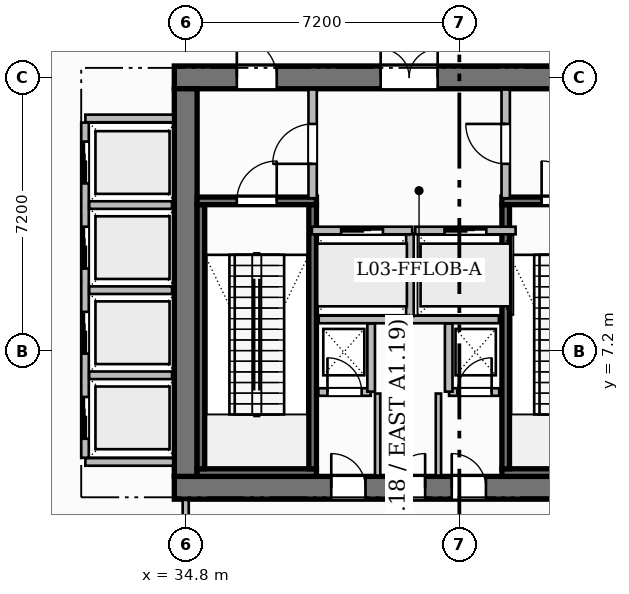
"""IFC4 building model, lengths in metres.
Left out: names, types, materials, properties, quantities, classifications, styles, units other than length and angle.
Written with IfcOpenShell. Run it as: python <this file> out.ifc"""

import sys

from ifc_helpers import new_model, si_unit, direction, frame, frame_2d, origin, place, context, subcontext, project, spatial, rectangle, extrude, source, transform, mapped, element, fill, save


model = new_model("IFC4")
c1 = context("Model", 3, precision=1e-05, world=origin(), true_north=direction((0.0, 1.0)))
c2 = subcontext(c1, "Body", "Model", "MODEL_VIEW")
j1 = project(units=[si_unit("LENGTHUNIT", "METRE"), si_unit("PLANEANGLEUNIT", "RADIAN")], contexts=[c1])
p1 = place(None, origin())
s1 = spatial("IfcSite", under=j1, at=p1, CompositionType="ELEMENT")
p2 = place(p1, origin())
s2 = spatial("IfcBuilding", under=s1, at=p2, CompositionType="ELEMENT")
p3 = place(p2, frame((0.0, 0.0, 16.2)))
s3 = spatial("IfcBuildingStorey", under=s2, at=p3, CompositionType="ELEMENT", Elevation=16.2)
p4 = place(p3, frame((34.5, 3.6, 0.0), z_axis=(0.0, 0.0, 1.0), x_axis=(1.0, 0.0, 0.0)))
e1 = element("IfcWall", 1, at=p4, inside=s3, PredefinedType="SHEAR", context=c2, shape_type="SweptSolid", body=[
    extrude(rectangle(XDim=15.6, YDim=0.6, at=frame_2d((7.8, 0.0))), origin(), (0.0, 0.0, 1.0), 5.4),
])
p5 = place(p4, frame((4.13, 0.0, 0.0)))
e2 = element("IfcOpeningElement", 2, at=p5, cuts=e1, PredefinedType="OPENING", context=c2, shape_type="SweptSolid", body=[
    extrude(rectangle(XDim=0.9, YDim=2.1, at=frame_2d((0.45, 1.05))), frame((0.0, 0.31, 0.0), z_axis=(0.0, -1.0, 0.0), x_axis=(1.0, 0.0, 0.0)), (0.0, 0.0, 1.0), 0.62),
])
p6 = place(p4, frame((5.7, 0.0, 0.0)))
e3 = element("IfcOpeningElement", 3, at=p6, cuts=e1, PredefinedType="OPENING", context=c2, shape_type="SweptSolid", body=[
    extrude(rectangle(XDim=0.9, YDim=2.1, at=frame_2d((0.45, 1.05))), frame((0.0, 0.31, 0.0), z_axis=(0.0, -1.0, 0.0), x_axis=(1.0, 0.0, 0.0)), (0.0, 0.0, 1.0), 0.62),
])
p7 = place(p4, frame((7.3, 0.0, 0.0)))
e4 = element("IfcOpeningElement", 4, at=p7, cuts=e1, PredefinedType="OPENING", context=c2, shape_type="SweptSolid", body=[
    extrude(rectangle(XDim=0.9, YDim=2.1, at=frame_2d((0.45, 1.05))), frame((0.0, 0.31, 0.0), z_axis=(0.0, -1.0, 0.0), x_axis=(1.0, 0.0, 0.0)), (0.0, 0.0, 1.0), 0.62),
])
p8 = place(p3, frame((34.5, 14.4, 0.0), z_axis=(0.0, 0.0, 1.0), x_axis=(1.0, 0.0, 0.0)))
e5 = element("IfcWall", 5, at=p8, inside=s3, PredefinedType="SHEAR", context=c2, shape_type="SweptSolid", body=[
    extrude(rectangle(XDim=15.6, YDim=0.6, at=frame_2d((7.8, 0.0))), origin(), (0.0, 0.0, 1.0), 5.4),
])
p9 = place(p8, frame((5.43, 0.0, 0.0)))
e6 = element("IfcOpeningElement", 6, at=p9, cuts=e5, PredefinedType="OPENING", context=c2, shape_type="SweptSolid", body=[
    extrude(rectangle(XDim=1.5, YDim=2.2, at=frame_2d((0.75, 1.1))), frame((0.0, 0.31, 0.0), z_axis=(0.0, -1.0, 0.0), x_axis=(1.0, 0.0, 0.0)), (0.0, 0.0, 1.0), 0.62),
])
p10 = place(p8, frame((1.645, 0.0, 0.0)))
e7 = element("IfcOpeningElement", 7, at=p10, cuts=e5, PredefinedType="OPENING", context=c2, shape_type="SweptSolid", body=[
    extrude(rectangle(XDim=1.05, YDim=2.15, at=frame_2d((0.525, 1.075))), frame((0.0, 0.31, 0.0), z_axis=(0.0, -1.0, 0.0), x_axis=(1.0, 0.0, 0.0)), (0.0, 0.0, 1.0), 0.62),
])
p11 = place(p8, frame((11.275, 0.0, 0.0)))
e8 = element("IfcOpeningElement", 8, at=p11, cuts=e5, PredefinedType="OPENING", context=c2, shape_type="SweptSolid", body=[
    extrude(rectangle(XDim=1.05, YDim=2.15, at=frame_2d((0.525, 1.075))), frame((0.0, 0.31, 0.0), z_axis=(0.0, -1.0, 0.0), x_axis=(1.0, 0.0, 0.0)), (0.0, 0.0, 1.0), 0.62),
])
p12 = place(p3, frame((34.8, 3.9, 0.0), z_axis=(0.0, 0.0, 1.0), x_axis=(0.0, 1.0, 0.0)))
e9 = element("IfcWall", 9, at=p12, inside=s3, PredefinedType="SHEAR", context=c2, shape_type="SweptSolid", body=[
    extrude(rectangle(XDim=10.2, YDim=0.6, at=frame_2d((5.1, 0.0))), origin(), (0.0, 0.0, 1.0), 5.4),
])
p13 = place(p3, frame((35.1, 4.0, 0.0), z_axis=(0.0, 0.0, 1.0), x_axis=(1.0, 0.0, 0.0)))
e10 = element("IfcWall", 10, at=p13, inside=s3, PredefinedType="SHEAR", context=c2, shape_type="SweptSolid", body=[
    extrude(rectangle(XDim=3.14, YDim=0.2, at=frame_2d((1.57, 0.0))), origin(), (0.0, 0.0, 1.0), 5.4),
])
for number, where, z_axis, x_axis in (
    (11, (35.2, 4.1, 0.0), (0.0, 0.0, 1.0), (0.0, 1.0, 0.0)),
    (12, (38.14, 4.1, 0.0), (0.0, 0.0, 1.0), (0.0, 1.0, 0.0)),
):
    element("IfcWall", number, at=place(p3, frame(where, z_axis=z_axis, x_axis=x_axis)), inside=s3, PredefinedType="SHEAR", context=c2, shape_type="SweptSolid", body=[
        extrude(rectangle(XDim=6.95, YDim=0.2, at=frame_2d((3.475, 0.0))), origin(), (0.0, 0.0, 1.0), 5.4),
    ])
p14 = place(p3, frame((35.1, 11.15, 0.0), z_axis=(0.0, 0.0, 1.0), x_axis=(1.0, 0.0, 0.0)))
e13 = element("IfcWall", 13, at=p14, inside=s3, PredefinedType="SHEAR", context=c2, shape_type="SweptSolid", body=[
    extrude(rectangle(XDim=3.14, YDim=0.2, at=frame_2d((1.57, 0.0))), origin(), (0.0, 0.0, 1.0), 5.4),
])
p15 = place(p14, frame((1.045, 0.0, 0.0)))
e14 = element("IfcOpeningElement", 14, at=p15, cuts=e13, PredefinedType="OPENING", context=c2, shape_type="SweptSolid", body=[
    extrude(rectangle(XDim=1.05, YDim=2.2, at=frame_2d((0.525, 1.1))), frame((0.0, 0.11, 0.0), z_axis=(0.0, -1.0, 0.0), x_axis=(1.0, 0.0, 0.0)), (0.0, 0.0, 1.0), 0.22),
])
p16 = place(p3, frame((43.12, 4.0, 0.0), z_axis=(0.0, 0.0, 1.0), x_axis=(1.0, 0.0, 0.0)))
e15 = element("IfcWall", 15, at=p16, inside=s3, PredefinedType="SHEAR", context=c2, shape_type="SweptSolid", body=[
    extrude(rectangle(XDim=6.38, YDim=0.2, at=frame_2d((3.19, 0.0))), origin(), (0.0, 0.0, 1.0), 5.4),
])
p17 = place(p3, frame((43.22, 4.1, 0.0), z_axis=(0.0, 0.0, 1.0), x_axis=(0.0, 1.0, 0.0)))
e16 = element("IfcWall", 16, at=p17, inside=s3, PredefinedType="SHEAR", context=c2, shape_type="SweptSolid", body=[
    extrude(rectangle(XDim=6.95, YDim=0.2, at=frame_2d((3.475, 0.0))), origin(), (0.0, 0.0, 1.0), 5.4),
])
p18 = place(p3, frame((43.12, 11.15, 0.0), z_axis=(0.0, 0.0, 1.0), x_axis=(1.0, 0.0, 0.0)))
e17 = element("IfcWall", 17, at=p18, inside=s3, PredefinedType="SHEAR", context=c2, shape_type="SweptSolid", body=[
    extrude(rectangle(XDim=6.38, YDim=0.2, at=frame_2d((3.19, 0.0))), origin(), (0.0, 0.0, 1.0), 5.4),
])
p19 = place(p18, frame((1.045, 0.0, 0.0)))
e18 = element("IfcOpeningElement", 18, at=p19, cuts=e17, PredefinedType="OPENING", context=c2, shape_type="SweptSolid", body=[
    extrude(rectangle(XDim=1.05, YDim=2.2, at=frame_2d((0.525, 1.1))), frame((0.0, 0.11, 0.0), z_axis=(0.0, -1.0, 0.0), x_axis=(1.0, 0.0, 0.0)), (0.0, 0.0, 1.0), 0.22),
])
p20 = place(p18, frame((4.125, 0.0, 0.0)))
e19 = element("IfcOpeningElement", 19, at=p20, cuts=e17, PredefinedType="OPENING", context=c2, shape_type="SweptSolid", body=[
    extrude(rectangle(XDim=1.05, YDim=2.2, at=frame_2d((0.525, 1.1))), frame((0.0, 0.11, 0.0), z_axis=(0.0, -1.0, 0.0), x_axis=(1.0, 0.0, 0.0)), (0.0, 0.0, 1.0), 0.22),
])
p21 = place(p3, frame((38.3, 8.03, 0.0), z_axis=(0.0, 0.0, 1.0), x_axis=(1.0, 0.0, 0.0)))
e20 = element("IfcWall", 20, at=p21, inside=s3, PredefinedType="PARTITIONING", context=c2, shape_type="SweptSolid", body=[
    extrude(rectangle(XDim=4.74, YDim=0.2, at=frame_2d((2.37, 0.0))), origin(), (0.0, 0.0, 1.0), 5.1),
])
p22 = place(p3, frame((40.7, 8.12, 0.0), z_axis=(0.0, 0.0, 1.0), x_axis=(0.0, 1.0, 0.0)))
e21 = element("IfcWall", 21, at=p22, inside=s3, PredefinedType="PARTITIONING", context=c2, shape_type="SweptSolid", body=[
    extrude(rectangle(XDim=2.18, YDim=0.2, at=frame_2d((1.09, 0.0))), origin(), (0.0, 0.0, 1.0), 5.1),
])
p23 = place(p3, frame((38.14, 11.22, 0.0), z_axis=(0.0, 0.0, 1.0), x_axis=(0.0, 1.0, 0.0)))
e22 = element("IfcWall", 22, at=p23, inside=s3, PredefinedType="PARTITIONING", context=c2, shape_type="SweptSolid", body=[
    extrude(rectangle(XDim=2.86, YDim=0.22, at=frame_2d((1.43, 0.0))), origin(), (0.0, 0.0, 1.0), 5.1),
])
p24 = place(p23, frame((0.905, 0.0, 0.0)))
e23 = element("IfcOpeningElement", 23, at=p24, cuts=e22, PredefinedType="OPENING", context=c2, shape_type="SweptSolid", body=[
    extrude(rectangle(XDim=1.05, YDim=2.15, at=frame_2d((0.525, 1.075))), frame((0.0, 0.12, 0.0), z_axis=(0.0, -1.0, 0.0), x_axis=(1.0, 0.0, 0.0)), (0.0, 0.0, 1.0), 0.24),
])
p25 = place(p3, frame((43.22, 11.22, 0.0), z_axis=(0.0, 0.0, 1.0), x_axis=(0.0, 1.0, 0.0)))
e24 = element("IfcWall", 24, at=p25, inside=s3, PredefinedType="PARTITIONING", context=c2, shape_type="SweptSolid", body=[
    extrude(rectangle(XDim=2.86, YDim=0.22, at=frame_2d((1.43, 0.0))), origin(), (0.0, 0.0, 1.0), 5.1),
])
p26 = place(p25, frame((0.905, 0.0, 0.0)))
e25 = element("IfcOpeningElement", 25, at=p26, cuts=e24, PredefinedType="OPENING", context=c2, shape_type="SweptSolid", body=[
    extrude(rectangle(XDim=1.05, YDim=2.15, at=frame_2d((0.525, 1.075))), frame((0.0, 0.12, 0.0), z_axis=(0.0, -1.0, 0.0), x_axis=(1.0, 0.0, 0.0)), (0.0, 0.0, 1.0), 0.24),
])
p27 = place(p3, frame((38.29, 6.12, 0.0), z_axis=(0.0, 0.0, 1.0), x_axis=(1.0, 0.0, 0.0)))
e26 = element("IfcWall", 26, at=p27, inside=s3, PredefinedType="PARTITIONING", context=c2, shape_type="SweptSolid", body=[
    extrude(rectangle(XDim=1.38, YDim=0.2, at=frame_2d((0.69, 0.0))), origin(), (0.0, 0.0, 1.0), 5.1),
])
p28 = place(p27, frame((0.24, 0.0, 0.0)))
e27 = element("IfcOpeningElement", 27, at=p28, cuts=e26, PredefinedType="OPENING", context=c2, shape_type="SweptSolid", body=[
    extrude(rectangle(XDim=0.9, YDim=2.1, at=frame_2d((0.45, 1.05))), frame((0.0, 0.11, 0.0), z_axis=(0.0, -1.0, 0.0), x_axis=(1.0, 0.0, 0.0)), (0.0, 0.0, 1.0), 0.22),
])
p29 = place(p3, frame((39.68, 6.13, 0.0), z_axis=(0.0, 0.0, 1.0), x_axis=(0.0, 1.0, 0.0)))
e28 = element("IfcWall", 28, at=p29, inside=s3, PredefinedType="PARTITIONING", context=c2, shape_type="SweptSolid", body=[
    extrude(rectangle(XDim=1.79, YDim=0.2, at=frame_2d((0.895, 0.0))), origin(), (0.0, 0.0, 1.0), 5.1),
])
p30 = place(p3, frame((41.73, 6.12, 0.0), z_axis=(0.0, 0.0, 1.0), x_axis=(1.0, 0.0, 0.0)))
e29 = element("IfcWall", 29, at=p30, inside=s3, PredefinedType="PARTITIONING", context=c2, shape_type="SweptSolid", body=[
    extrude(rectangle(XDim=1.32, YDim=0.2, at=frame_2d((0.66, 0.0))), origin(), (0.0, 0.0, 1.0), 5.1),
])
p31 = place(p30, frame((0.22, 0.0, 0.0)))
e30 = element("IfcOpeningElement", 30, at=p31, cuts=e29, PredefinedType="OPENING", context=c2, shape_type="SweptSolid", body=[
    extrude(rectangle(XDim=0.9, YDim=2.1, at=frame_2d((0.45, 1.05))), frame((0.0, 0.11, 0.0), z_axis=(0.0, -1.0, 0.0), x_axis=(1.0, 0.0, 0.0)), (0.0, 0.0, 1.0), 0.22),
])
p32 = place(p3, frame((41.72, 6.13, 0.0), z_axis=(0.0, 0.0, 1.0), x_axis=(0.0, 1.0, 0.0)))
e31 = element("IfcWall", 31, at=p32, inside=s3, PredefinedType="PARTITIONING", context=c2, shape_type="SweptSolid", body=[
    extrude(rectangle(XDim=1.79, YDim=0.2, at=frame_2d((0.895, 0.0))), origin(), (0.0, 0.0, 1.0), 5.1),
])
for number, where, z_axis, x_axis in (
    (32, (39.85, 3.92, 0.0), (0.0, 0.0, 1.0), (0.0, 1.0, 0.0)),
    (33, (41.45, 3.92, 0.0), (0.0, 0.0, 1.0), (0.0, 1.0, 0.0)),
):
    element("IfcWall", number, at=place(p3, frame(where, z_axis=z_axis, x_axis=x_axis)), inside=s3, PredefinedType="PARTITIONING", context=c2, shape_type="SweptSolid", body=[
        extrude(rectangle(XDim=2.16, YDim=0.14, at=frame_2d((1.08, 0.0))), origin(), (0.0, 0.0, 1.0), 5.1),
    ])
for number, where, z_axis, x_axis in (
    (34, (32.16, 4.28, 0.0), (0.0, 0.0, 1.0), (1.0, 0.0, 0.0)),
    (35, (32.16, 13.32, 0.0), (0.0, 0.0, 1.0), (1.0, 0.0, 0.0)),
):
    element("IfcWall", number, at=place(p3, frame(where, z_axis=z_axis, x_axis=x_axis)), inside=s3, PredefinedType="PARTITIONING", context=c2, shape_type="SweptSolid", body=[
        extrude(rectangle(XDim=2.31, YDim=0.2, at=frame_2d((1.155, 0.0))), origin(), (0.0, 0.0, 1.0), 5.1),
    ])
p33 = place(p3, frame((32.15, 4.39, 0.0), z_axis=(0.0, 0.0, 1.0), x_axis=(0.0, 1.0, 0.0)))
e36 = element("IfcWall", 36, at=p33, inside=s3, PredefinedType="PARTITIONING", context=c2, shape_type="SweptSolid", body=[
    extrude(rectangle(XDim=8.82, YDim=0.2, at=frame_2d((4.41, 0.0))), origin(), (0.0, 0.0, 1.0), 5.1),
])
p34 = place(p33, frame((0.5, 0.0, 0.0)))
e37 = element("IfcOpeningElement", 37, at=p34, cuts=e36, PredefinedType="OPENING", context=c2, shape_type="SweptSolid", body=[
    extrude(rectangle(XDim=1.1, YDim=2.2, at=frame_2d((0.55, 1.1))), frame((0.0, 0.11, 0.0), z_axis=(0.0, -1.0, 0.0), x_axis=(1.0, 0.0, 0.0)), (0.0, 0.0, 1.0), 0.22),
])
p35 = place(p33, frame((2.74, 0.0, 0.0)))
e38 = element("IfcOpeningElement", 38, at=p35, cuts=e36, PredefinedType="OPENING", context=c2, shape_type="SweptSolid", body=[
    extrude(rectangle(XDim=1.1, YDim=2.2, at=frame_2d((0.55, 1.1))), frame((0.0, 0.11, 0.0), z_axis=(0.0, -1.0, 0.0), x_axis=(1.0, 0.0, 0.0)), (0.0, 0.0, 1.0), 0.22),
])
p36 = place(p33, frame((4.98, 0.0, 0.0)))
e39 = element("IfcOpeningElement", 39, at=p36, cuts=e36, PredefinedType="OPENING", context=c2, shape_type="SweptSolid", body=[
    extrude(rectangle(XDim=1.1, YDim=2.2, at=frame_2d((0.55, 1.1))), frame((0.0, 0.11, 0.0), z_axis=(0.0, -1.0, 0.0), x_axis=(1.0, 0.0, 0.0)), (0.0, 0.0, 1.0), 0.22),
])
p37 = place(p33, frame((7.22, 0.0, 0.0)))
e40 = element("IfcOpeningElement", 40, at=p37, cuts=e36, PredefinedType="OPENING", context=c2, shape_type="SweptSolid", body=[
    extrude(rectangle(XDim=1.1, YDim=2.2, at=frame_2d((0.55, 1.1))), frame((0.0, 0.11, 0.0), z_axis=(0.0, -1.0, 0.0), x_axis=(1.0, 0.0, 0.0)), (0.0, 0.0, 1.0), 0.22),
])
for number, where, z_axis, x_axis in (
    (41, (32.26, 6.56, 0.0), (0.0, 0.0, 1.0), (1.0, 0.0, 0.0)),
    (42, (32.26, 8.8, 0.0), (0.0, 0.0, 1.0), (1.0, 0.0, 0.0)),
    (43, (32.26, 11.04, 0.0), (0.0, 0.0, 1.0), (1.0, 0.0, 0.0)),
):
    element("IfcWall", number, at=place(p3, frame(where, z_axis=z_axis, x_axis=x_axis)), inside=s3, PredefinedType="PARTITIONING", context=c2, shape_type="SweptSolid", body=[
        extrude(rectangle(XDim=2.18, YDim=0.2, at=frame_2d((1.09, 0.0))), origin(), (0.0, 0.0, 1.0), 5.1),
    ])
p38 = place(p3, frame((34.8, 0.32, 0.0), z_axis=(0.0, 0.0, 1.0), x_axis=(0.0, 1.0, 0.0)))
e44 = element("IfcWall", 44, at=p38, inside=s3, PredefinedType="PARTITIONING", context=c2, shape_type="SweptSolid", body=[
    extrude(rectangle(XDim=2.96, YDim=0.16, at=frame_2d((1.48, 0.0))), origin(), (0.0, 0.0, 1.0), 5.1),
])
p39 = place(p38, frame((0.955, 0.0, 0.0)))
e45 = element("IfcOpeningElement", 45, at=p39, cuts=e44, PredefinedType="OPENING", context=c2, shape_type="SweptSolid", body=[
    extrude(rectangle(XDim=1.05, YDim=2.15, at=frame_2d((0.525, 1.075))), frame((0.0, 0.09, 0.0), z_axis=(0.0, -1.0, 0.0), x_axis=(1.0, 0.0, 0.0)), (0.0, 0.0, 1.0), 0.18),
])
p40 = place(p3, frame((38.12, 10.37, 0.0), z_axis=(0.0, 0.0, 1.0), x_axis=(1.0, 0.0, 0.0)))
e46 = element("IfcWall", 46, at=p40, inside=s3, PredefinedType="PARTITIONING", context=c2, shape_type="SweptSolid", body=[
    extrude(rectangle(XDim=2.64, YDim=0.2, at=frame_2d((1.32, 0.0))), origin(), (0.0, 0.0, 1.0), 5.1),
])
p41 = place(p40, frame((0.77, 0.0, 0.0)))
e47 = element("IfcOpeningElement", 47, at=p41, cuts=e46, PredefinedType="OPENING", context=c2, shape_type="SweptSolid", body=[
    extrude(rectangle(XDim=1.1, YDim=2.2, at=frame_2d((0.55, 1.1))), frame((0.0, 0.11, 0.0), z_axis=(0.0, -1.0, 0.0), x_axis=(1.0, 0.0, 0.0)), (0.0, 0.0, 1.0), 0.22),
])
p42 = place(p3, frame((40.84, 10.37, 0.0), z_axis=(0.0, 0.0, 1.0), x_axis=(1.0, 0.0, 0.0)))
e48 = element("IfcWall", 48, at=p42, inside=s3, PredefinedType="PARTITIONING", context=c2, shape_type="SweptSolid", body=[
    extrude(rectangle(XDim=2.64, YDim=0.2, at=frame_2d((1.32, 0.0))), origin(), (0.0, 0.0, 1.0), 5.1),
])
p43 = place(p42, frame((0.77, 0.0, 0.0)))
e49 = element("IfcOpeningElement", 49, at=p43, cuts=e48, PredefinedType="OPENING", context=c2, shape_type="SweptSolid", body=[
    extrude(rectangle(XDim=1.1, YDim=2.2, at=frame_2d((0.55, 1.1))), frame((0.0, 0.11, 0.0), z_axis=(0.0, -1.0, 0.0), x_axis=(1.0, 0.0, 0.0)), (0.0, 0.0, 1.0), 0.22),
])
m1 = source(origin(), c2, "Body", "SweptSolid", [
    extrude(rectangle(XDim=1.05, YDim=2.2, at=frame_2d((0.525, 1.1))), frame((0.0, 0.025, 0.0), z_axis=(0.0, -1.0, 0.0), x_axis=(1.0, 0.0, 0.0)), (0.0, 0.0, 1.0), 0.05),
])
p44 = place(p15, origin())
e50 = element("IfcDoor", 50, at=p44, inside=s3, OperationType="SINGLE_SWING_RIGHT", PredefinedType="DOOR", context=c2, shape_type="MappedRepresentation", body=[
    mapped(m1, transform((0.0, 0.0, 0.0), scale=1.0)),
])
fill(e14, e50)
p45 = place(p19, origin())
e51 = element("IfcDoor", 51, at=p45, inside=s3, OperationType="SINGLE_SWING_LEFT", PredefinedType="DOOR", context=c2, shape_type="MappedRepresentation", body=[
    mapped(m1, transform((0.0, 0.0, 0.0), scale=1.0)),
])
fill(e18, e51)
m2 = source(origin(), c2, "Body", "SweptSolid", [
    extrude(rectangle(XDim=1.05, YDim=2.15, at=frame_2d((0.525, 1.075))), frame((0.0, 0.025, 0.0), z_axis=(0.0, -1.0, 0.0), x_axis=(1.0, 0.0, 0.0)), (0.0, 0.0, 1.0), 0.05),
])
p46 = place(p24, origin())
e52 = element("IfcDoor", 52, at=p46, inside=s3, OperationType="SINGLE_SWING_LEFT", PredefinedType="DOOR", context=c2, shape_type="MappedRepresentation", body=[
    mapped(m2, transform((0.0, 0.0, 0.0), scale=1.0)),
])
fill(e23, e52)
p47 = place(p26, origin())
e53 = element("IfcDoor", 53, at=p47, inside=s3, OperationType="SINGLE_SWING_RIGHT", PredefinedType="DOOR", context=c2, shape_type="MappedRepresentation", body=[
    mapped(m2, transform((0.0, 0.0, 0.0), scale=1.0)),
])
fill(e25, e53)
m3 = source(origin(), c2, "Body", "SweptSolid", [
    extrude(rectangle(XDim=1.5, YDim=2.2, at=frame_2d((0.75, 1.1))), frame((0.0, 0.025, 0.0), z_axis=(0.0, -1.0, 0.0), x_axis=(1.0, 0.0, 0.0)), (0.0, 0.0, 1.0), 0.05),
])
p48 = place(p9, origin())
e54 = element("IfcDoor", 54, at=p48, inside=s3, OperationType="DOUBLE_DOOR_SINGLE_SWING", PredefinedType="DOOR", context=c2, shape_type="MappedRepresentation", body=[
    mapped(m3, transform((0.0, 0.0, 0.0), scale=1.0)),
])
fill(e6, e54)
p49 = place(p10, origin())
e55 = element("IfcDoor", 55, at=p49, inside=s3, OperationType="SINGLE_SWING_LEFT", PredefinedType="DOOR", context=c2, shape_type="MappedRepresentation", body=[
    mapped(m2, transform((0.0, 0.0, 0.0), scale=1.0)),
])
fill(e7, e55)
m4 = source(origin(), c2, "Body", "SweptSolid", [
    extrude(rectangle(XDim=0.9, YDim=2.1, at=frame_2d((0.45, 1.05))), frame((0.0, 0.025, 0.0), z_axis=(0.0, -1.0, 0.0), x_axis=(1.0, 0.0, 0.0)), (0.0, 0.0, 1.0), 0.05),
])
p50 = place(p28, origin())
e56 = element("IfcDoor", 56, at=p50, inside=s3, OperationType="SINGLE_SWING_LEFT", PredefinedType="DOOR", context=c2, shape_type="MappedRepresentation", body=[
    mapped(m4, transform((0.0, 0.0, 0.0), scale=1.0)),
])
fill(e27, e56)
p51 = place(p31, origin())
e57 = element("IfcDoor", 57, at=p51, inside=s3, OperationType="SINGLE_SWING_RIGHT", PredefinedType="DOOR", context=c2, shape_type="MappedRepresentation", body=[
    mapped(m4, transform((0.0, 0.0, 0.0), scale=1.0)),
])
fill(e30, e57)
p52 = place(p5, origin())
e58 = element("IfcDoor", 58, at=p52, inside=s3, OperationType="SINGLE_SWING_LEFT", PredefinedType="DOOR", context=c2, shape_type="MappedRepresentation", body=[
    mapped(m4, transform((0.0, 0.0, 0.0), scale=1.0)),
])
fill(e2, e58)
p53 = place(p6, origin())
e59 = element("IfcDoor", 59, at=p53, inside=s3, OperationType="SINGLE_SWING_RIGHT", PredefinedType="DOOR", context=c2, shape_type="MappedRepresentation", body=[
    mapped(m4, transform((0.0, 0.0, 0.0), scale=1.0)),
])
fill(e3, e59)
p54 = place(p7, origin())
e60 = element("IfcDoor", 60, at=p54, inside=s3, OperationType="SINGLE_SWING_LEFT", PredefinedType="DOOR", context=c2, shape_type="MappedRepresentation", body=[
    mapped(m4, transform((0.0, 0.0, 0.0), scale=1.0)),
])
fill(e4, e60)
m5 = source(origin(), c2, "Body", "SweptSolid", [
    extrude(rectangle(XDim=1.1, YDim=2.2, at=frame_2d((0.55, 1.1))), frame((0.0, 0.025, 0.0), z_axis=(0.0, -1.0, 0.0), x_axis=(1.0, 0.0, 0.0)), (0.0, 0.0, 1.0), 0.05),
])
p55 = place(p41, origin())
e61 = element("IfcDoor", 61, at=p55, inside=s3, OperationType="SLIDING_TO_LEFT", PredefinedType="DOOR", context=c2, shape_type="MappedRepresentation", body=[
    mapped(m5, transform((0.0, 0.0, 0.0), scale=1.0)),
])
fill(e47, e61)
p56 = place(p43, origin())
e62 = element("IfcDoor", 62, at=p56, inside=s3, OperationType="SLIDING_TO_LEFT", PredefinedType="DOOR", context=c2, shape_type="MappedRepresentation", body=[
    mapped(m5, transform((0.0, 0.0, 0.0), scale=1.0)),
])
fill(e49, e62)
p57 = place(p34, origin())
e63 = element("IfcDoor", 63, at=p57, inside=s3, OperationType="SLIDING_TO_LEFT", PredefinedType="DOOR", context=c2, shape_type="MappedRepresentation", body=[
    mapped(m5, transform((0.0, 0.0, 0.0), scale=1.0)),
])
fill(e37, e63)
p58 = place(p35, origin())
e64 = element("IfcDoor", 64, at=p58, inside=s3, OperationType="SLIDING_TO_LEFT", PredefinedType="DOOR", context=c2, shape_type="MappedRepresentation", body=[
    mapped(m5, transform((0.0, 0.0, 0.0), scale=1.0)),
])
fill(e38, e64)
p59 = place(p36, origin())
e65 = element("IfcDoor", 65, at=p59, inside=s3, OperationType="SLIDING_TO_LEFT", PredefinedType="DOOR", context=c2, shape_type="MappedRepresentation", body=[
    mapped(m5, transform((0.0, 0.0, 0.0), scale=1.0)),
])
fill(e39, e65)
p60 = place(p37, origin())
e66 = element("IfcDoor", 66, at=p60, inside=s3, OperationType="SLIDING_TO_LEFT", PredefinedType="DOOR", context=c2, shape_type="MappedRepresentation", body=[
    mapped(m5, transform((0.0, 0.0, 0.0), scale=1.0)),
])
fill(e40, e66)
save(model, sys.argv[1])
